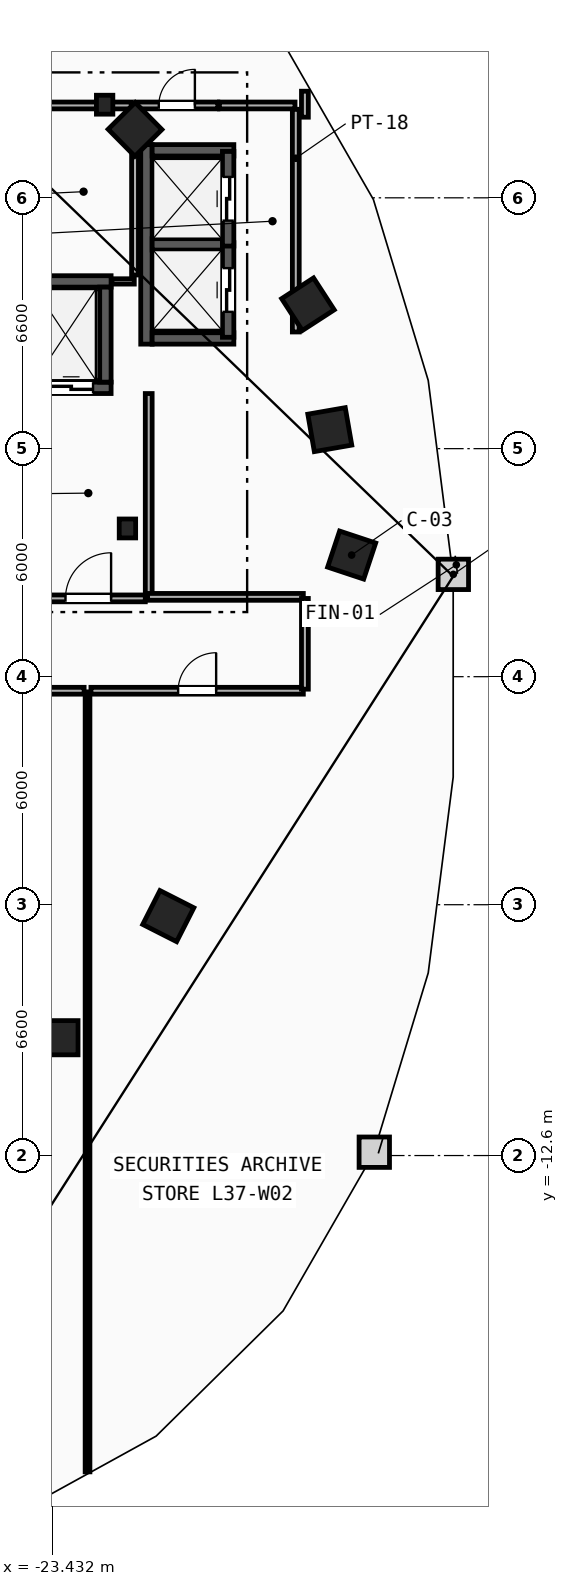
"""IFC4 building model, lengths in metres.
Left out: names, types, materials, properties, quantities, classifications, styles, units other than length and angle.
Written with IfcOpenShell. Run it as: python <this file> out.ifc"""

import sys

from ifc_helpers import new_model, si_unit, direction, frame, frame_2d, origin, origin_2d, place, context, subcontext, project, spatial, rectangle, i_section, extrude, element, fill, save


model = new_model("IFC4")
c1 = context("Model", 3, precision=1e-05, world=origin(), true_north=direction((0.0, 1.0)))
c2 = subcontext(c1, "Body", "Model", "MODEL_VIEW")
j1 = project(units=[si_unit("LENGTHUNIT", "METRE"), si_unit("PLANEANGLEUNIT", "RADIAN")], contexts=[c1])
p1 = place(None, origin())
s1 = spatial("IfcSite", under=j1, at=p1, CompositionType="ELEMENT")
p2 = place(p1, origin())
s2 = spatial("IfcBuilding", under=s1, at=p2, CompositionType="ELEMENT")
p3 = place(p2, frame((0.0, 0.0, 144.0)))
s3 = spatial("IfcBuildingStorey", under=s2, at=p3, CompositionType="ELEMENT", Elevation=144.0)
for number, where, z_axis, x_axis in (
    (1, (-21.45, 3.9, 0.0), (0.0, 0.0, 1.0), (1.0, 0.0, 0.0)),
    (2, (-22.05, 15.05, 0.0), (0.0, 0.0, 1.0), (1.0, 0.0, 0.0)),
):
    element("IfcColumn", number, at=place(p3, frame(where, z_axis=z_axis, x_axis=x_axis)), inside=s3, PredefinedType="COLUMN", context=c2, shape_type="SweptSolid", body=[
        extrude(i_section(OverallWidth=0.432, OverallDepth=0.498, WebThickness=0.056, FlangeThickness=0.089, FilletRadius=0.018, at=origin_2d()), origin(), (0.0, 0.0, 1.0), 3.6),
    ])
p4 = place(p3, frame((-23.2, -9.5, 0.0), z_axis=(0.0, 0.0, 1.0), x_axis=(1.0, 0.0, 0.0)))
e3 = element("IfcColumn", 3, at=p4, inside=s3, PredefinedType="COLUMN", context=c2, shape_type="SweptSolid", body=[
    extrude(rectangle(XDim=0.9, YDim=0.9, at=origin_2d()), origin(), (0.0, 0.0, 1.0), 3.6),
])
for number, where, z_axis, x_axis in (
    (4, (-15.55, 3.2, 0.0), (0.0, 0.0, 1.0), (0.315, 0.949, 0.0)),
    (5, (-16.125, 6.5, 0.0), (0.0, 0.0, 1.0), (-0.172, 0.985, 0.0)),
    (6, (-16.7, 9.8, 0.0), (0.0, 0.0, 1.0), (-0.544, 0.839, 0.0)),
    (7, (-21.25, 14.4, 0.0), (0.0, 0.0, 1.0), (-0.703, 0.711, 0.0)),
    (8, (-20.375, -6.3, 0.0), (0.0, 0.0, 1.0), (0.453, 0.892, 0.0)),
):
    element("IfcColumn", number, at=place(p3, frame(where, z_axis=z_axis, x_axis=x_axis)), inside=s3, PredefinedType="COLUMN", context=c2, shape_type="SweptSolid", body=[
        extrude(rectangle(XDim=1.0, YDim=1.0, at=origin_2d()), origin(), (0.0, 0.0, 1.0), 3.6),
    ])
p5 = place(p3, frame((-20.89, 2.15, 0.0), z_axis=(0.0, 0.0, 1.0), x_axis=(0.0, 1.0, 0.0)))
e9 = element("IfcWall", 9, at=p5, inside=s3, PredefinedType="PARTITIONING", context=c2, shape_type="SweptSolid", body=[
    extrude(rectangle(XDim=5.3, YDim=0.18, at=frame_2d((2.65, 0.0))), origin(), (0.0, 0.0, 1.0), 3.36),
])
p6 = place(p3, frame((-23.98, 2.06, 0.0), z_axis=(0.0, 0.0, 1.0), x_axis=(1.0, 0.0, 0.0)))
e10 = element("IfcWall", 10, at=p6, inside=s3, PredefinedType="PARTITIONING", context=c2, shape_type="SweptSolid", body=[
    extrude(rectangle(XDim=3.0, YDim=0.18, at=frame_2d((1.5, 0.0))), origin(), (0.0, 0.0, 1.0), 3.36),
])
p7 = place(p6, frame((0.9, 0.0, 0.0)))
e11 = element("IfcOpeningElement", 11, at=p7, cuts=e10, PredefinedType="OPENING", context=c2, shape_type="SweptSolid", body=[
    extrude(rectangle(XDim=1.2, YDim=2.15, at=frame_2d((0.6, 1.075))), frame((0.0, 0.1, 0.0), z_axis=(0.0, -1.0, 0.0), x_axis=(1.0, 0.0, 0.0)), (0.0, 0.0, 1.0), 0.2),
])
p8 = place(p3, frame((-23.98, 7.6, 0.0), z_axis=(0.0, 0.0, 1.0), x_axis=(1.0, 0.0, 0.0)))
e12 = element("IfcWall", 12, at=p8, inside=s3, PredefinedType="SHEAR", context=c2, shape_type="SweptSolid", body=[
    extrude(rectangle(XDim=2.1, YDim=0.3, at=frame_2d((1.05, 0.0))), origin(), (0.0, 0.0, 1.0), 3.36),
])
p9 = place(p8, frame((0.475, 0.0, 0.0)))
e13 = element("IfcOpeningElement", 13, at=p9, cuts=e12, PredefinedType="OPENING", context=c2, shape_type="SweptSolid", body=[
    extrude(rectangle(XDim=1.15, YDim=2.2, at=frame_2d((0.575, 1.1))), frame((0.0, 0.16, 0.0), z_axis=(0.0, -1.0, 0.0), x_axis=(1.0, 0.0, 0.0)), (0.0, 0.0, 1.0), 0.32),
])
p10 = place(p3, frame((-23.98, 10.4, 0.0), z_axis=(0.0, 0.0, 1.0), x_axis=(1.0, 0.0, 0.0)))
e14 = element("IfcWall", 14, at=p10, inside=s3, PredefinedType="SHEAR", context=c2, shape_type="SweptSolid", body=[
    extrude(rectangle(XDim=2.1, YDim=0.3, at=frame_2d((1.05, 0.0))), origin(), (0.0, 0.0, 1.0), 3.36),
])
p11 = place(p3, frame((-22.03, 7.75, 0.0), z_axis=(0.0, 0.0, 1.0), x_axis=(0.0, 1.0, 0.0)))
e15 = element("IfcWall", 15, at=p11, inside=s3, PredefinedType="SHEAR", context=c2, shape_type="SweptSolid", body=[
    extrude(rectangle(XDim=2.5, YDim=0.3, at=frame_2d((1.25, 0.0))), origin(), (0.0, 0.0, 1.0), 3.36),
])
p12 = place(p3, frame((-20.95, 8.75, 0.0), z_axis=(0.0, 0.0, 1.0), x_axis=(0.0, 1.0, 0.0)))
e16 = element("IfcWall", 16, at=p12, inside=s3, PredefinedType="SHEAR", context=c2, shape_type="SweptSolid", body=[
    extrude(rectangle(XDim=5.25, YDim=0.3, at=frame_2d((2.625, 0.0))), origin(), (0.0, 0.0, 1.0), 3.36),
])
for number, where, z_axis, x_axis in (
    (17, (-20.8, 8.9, 0.0), (0.0, 0.0, 1.0), (1.0, 0.0, 0.0)),
    (18, (-20.8, 13.85, 0.0), (0.0, 0.0, 1.0), (1.0, 0.0, 0.0)),
):
    element("IfcWall", number, at=place(p3, frame(where, z_axis=z_axis, x_axis=x_axis)), inside=s3, PredefinedType="SHEAR", context=c2, shape_type="SweptSolid", body=[
        extrude(rectangle(XDim=2.15, YDim=0.3, at=frame_2d((1.075, 0.0))), origin(), (0.0, 0.0, 1.0), 3.36),
    ])
p13 = place(p3, frame((-20.8, 11.375, 0.0), z_axis=(0.0, 0.0, 1.0), x_axis=(1.0, 0.0, 0.0)))
e19 = element("IfcWall", 19, at=p13, inside=s3, PredefinedType="SHEAR", context=c2, shape_type="SweptSolid", body=[
    extrude(rectangle(XDim=1.85, YDim=0.3, at=frame_2d((0.925, 0.0))), origin(), (0.0, 0.0, 1.0), 3.36),
])
p14 = place(p3, frame((-18.8, 8.93, 0.0), z_axis=(0.0, 0.0, 1.0), x_axis=(0.0, 1.0, 0.0)))
e20 = element("IfcWall", 20, at=p14, inside=s3, PredefinedType="SHEAR", context=c2, shape_type="SweptSolid", body=[
    extrude(rectangle(XDim=2.49, YDim=0.3, at=frame_2d((1.245, 0.0))), origin(), (0.0, 0.0, 1.0), 3.36),
])
p15 = place(p14, frame((0.67, 0.0, 0.0)))
e21 = element("IfcOpeningElement", 21, at=p15, cuts=e20, PredefinedType="OPENING", context=c2, shape_type="SweptSolid", body=[
    extrude(rectangle(XDim=1.15, YDim=2.2, at=frame_2d((0.575, 1.1))), frame((0.0, 0.16, 0.0), z_axis=(0.0, -1.0, 0.0), x_axis=(1.0, 0.0, 0.0)), (0.0, 0.0, 1.0), 0.32),
])
p16 = place(p3, frame((-18.8, 11.33, 0.0), z_axis=(0.0, 0.0, 1.0), x_axis=(0.0, 1.0, 0.0)))
e22 = element("IfcWall", 22, at=p16, inside=s3, PredefinedType="SHEAR", context=c2, shape_type="SweptSolid", body=[
    extrude(rectangle(XDim=2.49, YDim=0.3, at=frame_2d((1.245, 0.0))), origin(), (0.0, 0.0, 1.0), 3.36),
])
p17 = place(p16, frame((0.67, 0.0, 0.0)))
e23 = element("IfcOpeningElement", 23, at=p17, cuts=e22, PredefinedType="OPENING", context=c2, shape_type="SweptSolid", body=[
    extrude(rectangle(XDim=1.15, YDim=2.2, at=frame_2d((0.575, 1.1))), frame((0.0, 0.16, 0.0), z_axis=(0.0, -1.0, 0.0), x_axis=(1.0, 0.0, 0.0)), (0.0, 0.0, 1.0), 0.32),
])
p18 = place(p3, frame((-17.02, 9.07, 0.0), z_axis=(0.0, 0.0, 1.0), x_axis=(0.0, 1.0, 0.0)))
e24 = element("IfcWall", 24, at=p18, inside=s3, PredefinedType="PARTITIONING", context=c2, shape_type="SweptSolid", body=[
    extrude(rectangle(XDim=5.86, YDim=0.18, at=frame_2d((2.93, 0.0))), origin(), (0.0, 0.0, 1.0), 3.36),
])
p19 = place(p3, frame((-21.23, 15.03, 0.0), z_axis=(0.0, 0.0, 1.0), x_axis=(1.0, 0.0, 0.0)))
e25 = element("IfcWall", 25, at=p19, inside=s3, PredefinedType="PARTITIONING", context=c2, shape_type="SweptSolid", body=[
    extrude(rectangle(XDim=2.16, YDim=0.18, at=frame_2d((1.08, 0.0))), origin(), (0.0, 0.0, 1.0), 3.36),
])
p20 = place(p19, frame((0.605, 0.0, 0.0)))
e26 = element("IfcOpeningElement", 26, at=p20, cuts=e25, PredefinedType="OPENING", context=c2, shape_type="SweptSolid", body=[
    extrude(rectangle(XDim=0.95, YDim=2.1, at=frame_2d((0.475, 1.05))), frame((0.0, 0.1, 0.0), z_axis=(0.0, -1.0, 0.0), x_axis=(1.0, 0.0, 0.0)), (0.0, 0.0, 1.0), 0.2),
])
p21 = place(p3, frame((-19.03, 15.03, 0.0), z_axis=(0.0, 0.0, 1.0), x_axis=(1.0, 0.0, 0.0)))
e27 = element("IfcWall", 27, at=p21, inside=s3, PredefinedType="PARTITIONING", context=c2, shape_type="SweptSolid", body=[
    extrude(rectangle(XDim=1.99, YDim=0.18, at=frame_2d((0.995, 0.0))), origin(), (0.0, 0.0, 1.0), 3.36),
])
p22 = place(p3, frame((-21.86, 10.4, 0.0), z_axis=(0.0, 0.0, 1.0), x_axis=(1.0, 0.0, 0.0)))
e28 = element("IfcWall", 28, at=p22, inside=s3, PredefinedType="PARTITIONING", context=c2, shape_type="SweptSolid", body=[
    extrude(rectangle(XDim=0.59, YDim=0.14, at=frame_2d((0.295, 0.0))), origin(), (0.0, 0.0, 1.0), 3.36),
])
p23 = place(p3, frame((-21.25, 10.57, 0.0), z_axis=(0.0, 0.0, 1.0), x_axis=(0.0, 1.0, 0.0)))
e29 = element("IfcWall", 29, at=p23, inside=s3, PredefinedType="PARTITIONING", context=c2, shape_type="SweptSolid", body=[
    extrude(rectangle(XDim=4.36, YDim=0.18, at=frame_2d((2.18, 0.0))), origin(), (0.0, 0.0, 1.0), 3.36),
])
p24 = place(p3, frame((-23.96, 15.03, 0.0), z_axis=(0.0, 0.0, 1.0), x_axis=(1.0, 0.0, 0.0)))
e30 = element("IfcWall", 30, at=p24, inside=s3, PredefinedType="PARTITIONING", context=c2, shape_type="SweptSolid", body=[
    extrude(rectangle(XDim=2.61, YDim=0.18, at=frame_2d((1.305, 0.0))), origin(), (0.0, 0.0, 1.0), 2.433),
])
p25 = place(p3, frame((-22.5, -20.923, 0.0), z_axis=(0.0, 0.0, 1.0), x_axis=(0.0, 1.0, 0.0)))
e31 = element("IfcWall", 31, at=p25, inside=s3, PredefinedType="PARTITIONING", context=c2, shape_type="SweptSolid", body=[
    extrude(rectangle(XDim=20.523, YDim=0.125, at=frame_2d((10.262, 0.0))), origin(), (0.0, 0.0, 1.0), 2.665),
])
p26 = place(p3, frame((-25.4, -0.37, 0.0), z_axis=(0.0, 0.0, 1.0), x_axis=(1.0, 0.0, 0.0)))
e32 = element("IfcWall", 32, at=p26, inside=s3, PredefinedType="PARTITIONING", context=c2, shape_type="SweptSolid", body=[
    extrude(rectangle(XDim=2.81, YDim=0.18, at=frame_2d((1.405, 0.0))), origin(), (0.0, 0.0, 1.0), 3.36),
])
p27 = place(p3, frame((-22.41, -0.37, 0.0), z_axis=(0.0, 0.0, 1.0), x_axis=(1.0, 0.0, 0.0)))
e33 = element("IfcWall", 33, at=p27, inside=s3, PredefinedType="PARTITIONING", context=c2, shape_type="SweptSolid", body=[
    extrude(rectangle(XDim=5.588, YDim=0.18, at=frame_2d((2.794, 0.0))), origin(), (0.0, 0.0, 1.0), 3.36),
])
p28 = place(p27, frame((2.294, 0.0, 0.0)))
e34 = element("IfcOpeningElement", 34, at=p28, cuts=e33, PredefinedType="OPENING", context=c2, shape_type="SweptSolid", body=[
    extrude(rectangle(XDim=1.0, YDim=2.15, at=frame_2d((0.5, 1.075))), frame((0.0, 0.1, 0.0), z_axis=(0.0, -1.0, 0.0), x_axis=(1.0, 0.0, 0.0)), (0.0, 0.0, 1.0), 0.2),
])
p29 = place(p3, frame((-16.822, 2.1, 0.0), z_axis=(0.0, 0.0, 1.0), x_axis=(-1.0, 0.0, 0.0)))
e35 = element("IfcWall", 35, at=p29, inside=s3, PredefinedType="PARTITIONING", context=c2, shape_type="SweptSolid", body=[
    extrude(rectangle(XDim=4.098, YDim=0.18, at=frame_2d((2.049, 0.0))), origin(), (0.0, 0.0, 1.0), 3.36),
])
p30 = place(p3, frame((-16.78, -0.329, 0.0), z_axis=(0.0, 0.0, 1.0), x_axis=(0.0, 1.0, 0.0)))
e36 = element("IfcWall", 36, at=p30, inside=s3, PredefinedType="PARTITIONING", context=c2, shape_type="SweptSolid", body=[
    extrude(rectangle(XDim=2.387, YDim=0.18, at=frame_2d((1.194, 0.0))), origin(), (0.0, 0.0, 1.0), 3.36),
])
p31 = place(p3, frame((-16.78, 14.721, 0.0), z_axis=(0.0, 0.0, 1.0), x_axis=(0.0, 1.0, 0.0)))
e37 = element("IfcWall", 37, at=p31, inside=s3, PredefinedType="PARTITIONING", context=c2, shape_type="SweptSolid", body=[
    extrude(rectangle(XDim=0.684, YDim=0.18, at=frame_2d((0.342, 0.0))), origin(), (0.0, 0.0, 1.0), 3.36),
])
p32 = place(p7, origin())
e38 = element("IfcDoor", 38, at=p32, inside=s3, OperationType="SINGLE_SWING_RIGHT", PredefinedType="DOOR", context=c2, shape_type="SweptSolid", body=[
    extrude(rectangle(XDim=1.2, YDim=2.15, at=frame_2d((0.6, 1.075))), frame((0.0, 0.025, 0.0), z_axis=(0.0, -1.0, 0.0), x_axis=(1.0, 0.0, 0.0)), (0.0, 0.0, 1.0), 0.05),
])
fill(e11, e38)
p33 = place(p9, origin())
e39 = element("IfcDoor", 39, at=p33, inside=s3, OperationType="SLIDING_TO_LEFT", PredefinedType="TRAPDOOR", context=c2, shape_type="SweptSolid", body=[
    extrude(rectangle(XDim=1.15, YDim=2.2, at=frame_2d((0.575, 1.1))), frame((0.0, 0.025, 0.0), z_axis=(0.0, -1.0, 0.0), x_axis=(1.0, 0.0, 0.0)), (0.0, 0.0, 1.0), 0.05),
])
fill(e13, e39)
p34 = place(p15, origin())
e40 = element("IfcDoor", 40, at=p34, inside=s3, OperationType="SLIDING_TO_LEFT", PredefinedType="TRAPDOOR", context=c2, shape_type="SweptSolid", body=[
    extrude(rectangle(XDim=1.15, YDim=2.2, at=frame_2d((0.575, 1.1))), frame((0.0, 0.025, 0.0), z_axis=(0.0, -1.0, 0.0), x_axis=(1.0, 0.0, 0.0)), (0.0, 0.0, 1.0), 0.05),
])
fill(e21, e40)
p35 = place(p17, origin())
e41 = element("IfcDoor", 41, at=p35, inside=s3, OperationType="SLIDING_TO_LEFT", PredefinedType="TRAPDOOR", context=c2, shape_type="SweptSolid", body=[
    extrude(rectangle(XDim=1.15, YDim=2.2, at=frame_2d((0.575, 1.1))), frame((0.0, 0.025, 0.0), z_axis=(0.0, -1.0, 0.0), x_axis=(1.0, 0.0, 0.0)), (0.0, 0.0, 1.0), 0.05),
])
fill(e23, e41)
p36 = place(p28, origin())
e42 = element("IfcDoor", 42, at=p36, inside=s3, OperationType="SINGLE_SWING_RIGHT", PredefinedType="DOOR", context=c2, shape_type="SweptSolid", body=[
    extrude(rectangle(XDim=1.0, YDim=2.15, at=frame_2d((0.5, 1.075))), frame((0.0, 0.025, 0.0), z_axis=(0.0, -1.0, 0.0), x_axis=(1.0, 0.0, 0.0)), (0.0, 0.0, 1.0), 0.05),
])
fill(e34, e42)
p37 = place(p20, origin())
e43 = element("IfcDoor", 43, at=p37, inside=s3, OperationType="SINGLE_SWING_RIGHT", PredefinedType="DOOR", context=c2, shape_type="SweptSolid", body=[
    extrude(rectangle(XDim=0.95, YDim=2.1, at=frame_2d((0.475, 1.05))), frame((0.0, 0.025, 0.0), z_axis=(0.0, -1.0, 0.0), x_axis=(1.0, 0.0, 0.0)), (0.0, 0.0, 1.0), 0.05),
])
fill(e26, e43)
save(model, sys.argv[1])
